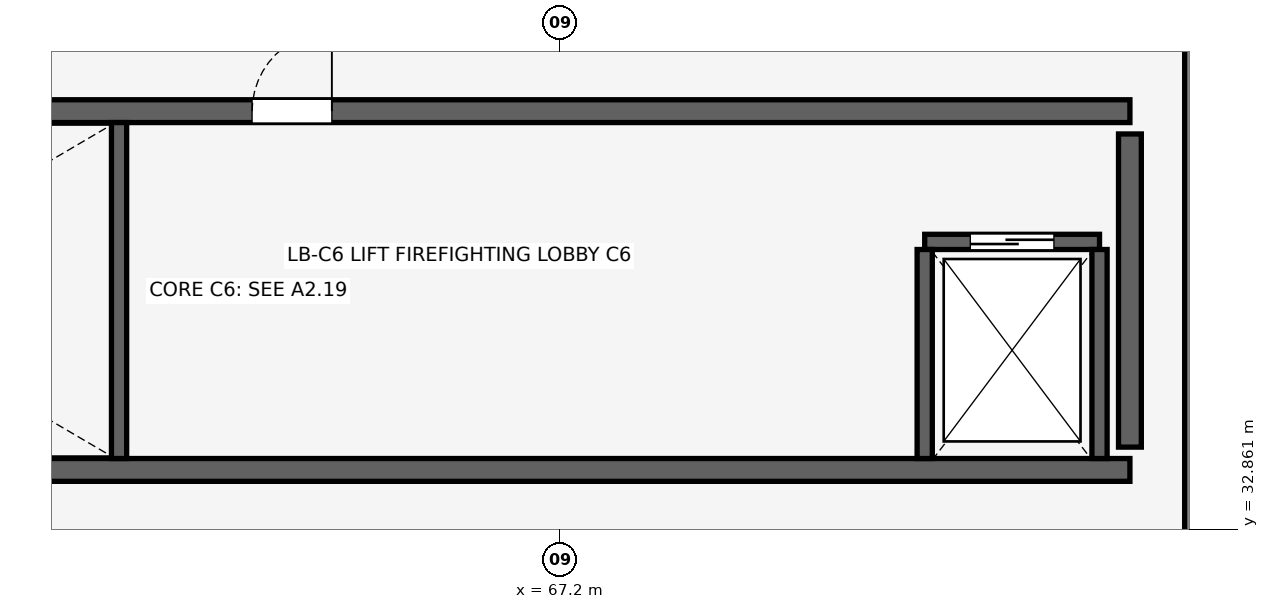
"""IFC4 building model, lengths in metres.
Left out: names, types, materials, properties, quantities, classifications, styles, units other than length and angle.
Written with IfcOpenShell. Run it as: python <this file> out.ifc"""

import sys

from ifc_helpers import new_model, si_unit, direction, frame, frame_2d, origin, place, context, subcontext, project, spatial, rectangle, extrude, element, fill, save


model = new_model("IFC4")
c1 = context("Model", 3, precision=1e-05, world=origin(), true_north=direction((0.0, 1.0)))
c2 = subcontext(c1, "Body", "Model", "MODEL_VIEW")
j1 = project(units=[si_unit("LENGTHUNIT", "METRE"), si_unit("PLANEANGLEUNIT", "RADIAN")], contexts=[c1])
p1 = place(None, origin())
s1 = spatial("IfcSite", under=j1, at=p1, CompositionType="ELEMENT")
p2 = place(p1, origin())
s2 = spatial("IfcBuilding", under=s1, at=p2, CompositionType="ELEMENT")
p3 = place(p2, frame((0.0, 0.0, 9.52)))
s3 = spatial("IfcBuildingStorey", under=s2, at=p3, CompositionType="ELEMENT", Elevation=9.52)
p4 = place(p3, frame((51.5, 33.64, 0.0), z_axis=(0.0, 0.0, 1.0), x_axis=(1.0, 0.0, 0.0)))
e1 = element("IfcWall", 1, at=p4, inside=s3, PredefinedType="SHEAR", context=c2, shape_type="SweptSolid", body=[
    extrude(rectangle(XDim=23.2, YDim=0.3, at=frame_2d((11.6, 0.0))), origin(), (0.0, 0.0, 1.0), 3.57),
])
p5 = place(p3, frame((51.5, 38.36, 0.0), z_axis=(0.0, 0.0, 1.0), x_axis=(1.0, 0.0, 0.0)))
e2 = element("IfcWall", 2, at=p5, inside=s3, PredefinedType="SHEAR", context=c2, shape_type="SweptSolid", body=[
    extrude(rectangle(XDim=23.2, YDim=0.3, at=frame_2d((11.6, 0.0))), origin(), (0.0, 0.0, 1.0), 3.57),
])
p6 = place(p5, frame((0.45, 0.0, 0.0), z_axis=(0.0, 0.0, 1.0), x_axis=(1.0, 0.0, 0.0)))
e3 = element("IfcOpeningElement", 3, at=p6, cuts=e2, PredefinedType="OPENING", context=c2, shape_type="SweptSolid", body=[
    extrude(rectangle(XDim=1.4, YDim=2.15, at=frame_2d((0.7, 1.075))), frame((0.0, 0.16, 0.0), z_axis=(0.0, -1.0, 0.0), x_axis=(1.0, 0.0, 0.0)), (0.0, 0.0, 1.0), 0.32),
])
p7 = place(p5, frame((11.65, 0.0, 0.0), z_axis=(0.0, 0.0, 1.0), x_axis=(1.0, 0.0, 0.0)))
e4 = element("IfcOpeningElement", 4, at=p7, cuts=e2, PredefinedType="OPENING", context=c2, shape_type="SweptSolid", body=[
    extrude(rectangle(XDim=1.05, YDim=2.15, at=frame_2d((0.525, 1.075))), frame((0.0, 0.16, 0.0), z_axis=(0.0, -1.0, 0.0), x_axis=(1.0, 0.0, 0.0)), (0.0, 0.0, 1.0), 0.32),
])
p8 = place(p3, frame((74.7, 33.94, 0.0), z_axis=(0.0, 0.0, 1.0), x_axis=(0.0, 1.0, 0.0)))
e5 = element("IfcWall", 5, at=p8, inside=s3, PredefinedType="SHEAR", context=c2, shape_type="SweptSolid", body=[
    extrude(rectangle(XDim=4.12, YDim=0.3, at=frame_2d((2.06, 0.0))), origin(), (0.0, 0.0, 1.0), 3.57),
])
p9 = place(p3, frame((75.6, 32.187, 0.0), z_axis=(0.0, 0.0, 1.0), x_axis=(0.0, 1.0, 0.0)))
e6 = element("IfcWall", 6, at=p9, inside=s3, PredefinedType="SOLIDWALL", context=c2, shape_type="SweptSolid", body=[
    extrude(rectangle(XDim=7.625, YDim=0.36, at=frame_2d((3.813, 0.0))), origin(), (0.0, 0.0, 1.0), 3.27),
])
p10 = place(p3, frame((61.4, 33.79, 0.0), z_axis=(0.0, 0.0, 1.0), x_axis=(0.0, 1.0, 0.0)))
e7 = element("IfcWall", 7, at=p10, inside=s3, PredefinedType="SHEAR", context=c2, shape_type="SweptSolid", body=[
    extrude(rectangle(XDim=4.42, YDim=0.2, at=frame_2d((2.21, 0.0))), origin(), (0.0, 0.0, 1.0), 3.57),
])
p11 = place(p3, frame((72.0, 36.64, 0.0), z_axis=(0.0, 0.0, 1.0), x_axis=(1.0, 0.0, 0.0)))
e8 = element("IfcWall", 8, at=p11, inside=s3, PredefinedType="SHEAR", context=c2, shape_type="SweptSolid", body=[
    extrude(rectangle(XDim=2.3, YDim=0.2, at=frame_2d((1.15, 0.0))), origin(), (0.0, 0.0, 1.0), 3.57),
])
p12 = place(p11, frame((0.6, 0.0, 0.0), z_axis=(0.0, 0.0, 1.0), x_axis=(1.0, 0.0, 0.0)))
e9 = element("IfcOpeningElement", 9, at=p12, cuts=e8, PredefinedType="OPENING", context=c2, shape_type="SweptSolid", body=[
    extrude(rectangle(XDim=1.1, YDim=2.15, at=frame_2d((0.55, 1.075))), frame((0.0, 0.11, 0.0), z_axis=(0.0, -1.0, 0.0), x_axis=(1.0, 0.0, 0.0)), (0.0, 0.0, 1.0), 0.22),
])
for number, where, z_axis, x_axis in (
    (10, (72.0, 33.79, 0.0), (0.0, 0.0, 1.0), (0.0, 1.0, 0.0)),
    (11, (74.3, 33.79, 0.0), (0.0, 0.0, 1.0), (0.0, 1.0, 0.0)),
):
    element("IfcWall", number, at=place(p3, frame(where, z_axis=z_axis, x_axis=x_axis)), inside=s3, PredefinedType="SHEAR", context=c2, shape_type="SweptSolid", body=[
        extrude(rectangle(XDim=2.75, YDim=0.2, at=frame_2d((1.375, 0.0))), origin(), (0.0, 0.0, 1.0), 3.57),
    ])
p13 = place(p7, origin())
e12 = element("IfcDoor", 12, at=p13, inside=s3, OperationType="SINGLE_SWING_RIGHT", PredefinedType="DOOR", context=c2, shape_type="SweptSolid", body=[
    extrude(rectangle(XDim=1.05, YDim=2.15, at=frame_2d((0.525, 1.075))), frame((0.0, 0.025, 0.0), z_axis=(0.0, -1.0, 0.0), x_axis=(1.0, 0.0, 0.0)), (0.0, 0.0, 1.0), 0.05),
])
fill(e4, e12)
p14 = place(p12, origin())
e13 = element("IfcDoor", 13, at=p14, inside=s3, OperationType="DOUBLE_DOOR_SLIDING", PredefinedType="DOOR", context=c2, shape_type="SweptSolid", body=[
    extrude(rectangle(XDim=1.1, YDim=2.15, at=frame_2d((0.55, 1.075))), frame((0.0, 0.025, 0.0), z_axis=(0.0, -1.0, 0.0), x_axis=(1.0, 0.0, 0.0)), (0.0, 0.0, 1.0), 0.05),
])
fill(e9, e13)
save(model, sys.argv[1])
